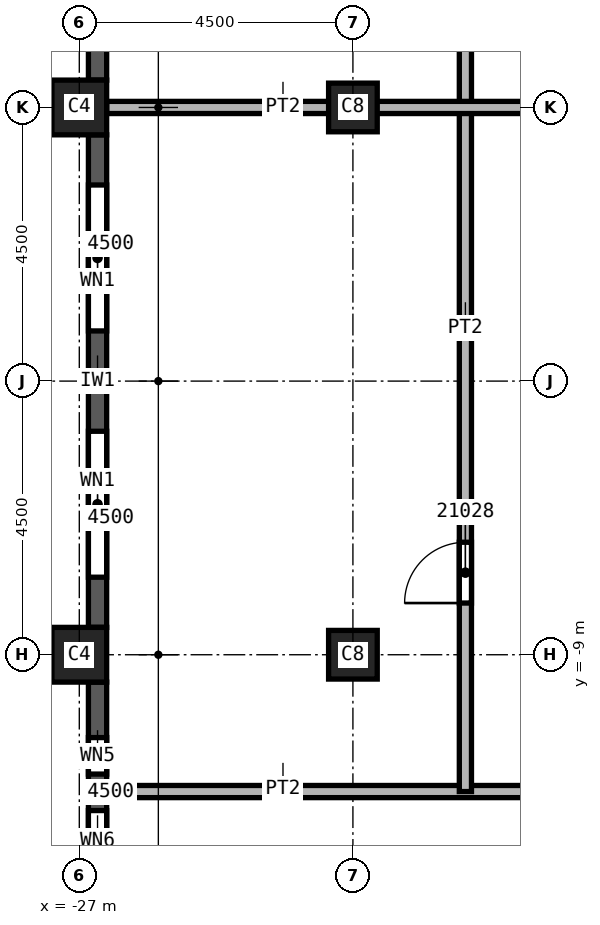
"""IFC4 building model, lengths in metres.
Left out: names, types, materials, properties, quantities, classifications, styles, units other than length and angle.
Written with IfcOpenShell. Run it as: python <this file> out.ifc"""

import sys

from ifc_helpers import new_model, si_unit, direction, frame, frame_2d, origin, origin_2d, place, context, subcontext, project, spatial, rectangle, extrude, element, fill, save


model = new_model("IFC4")
c1 = context("Model", 3, precision=1e-05, world=origin(), true_north=direction((0.0, 1.0)))
c2 = subcontext(c1, "Body", "Model", "MODEL_VIEW")
j1 = project(units=[si_unit("LENGTHUNIT", "METRE"), si_unit("PLANEANGLEUNIT", "RADIAN")], contexts=[c1])
p1 = place(None, origin())
s1 = spatial("IfcSite", under=j1, at=p1, CompositionType="ELEMENT")
p2 = place(p1, origin())
s2 = spatial("IfcBuilding", under=s1, at=p2, CompositionType="ELEMENT")
p3 = place(p2, frame((0.0, 0.0, 308.0)))
s3 = spatial("IfcBuildingStorey", under=s2, at=p3, CompositionType="ELEMENT", Elevation=308.0)
for number, where, z_axis, x_axis in (
    (1, (-22.5, 0.0, 0.0), (0.0, 0.0, 1.0), (1.0, 0.0, 0.0)),
    (2, (-22.5, -9.0, 0.0), (0.0, 0.0, 1.0), (1.0, 0.0, 0.0)),
):
    element("IfcColumn", number, at=place(p3, frame(where, z_axis=z_axis, x_axis=x_axis)), inside=s3, PredefinedType="COLUMN", context=c2, shape_type="SweptSolid", body=[
        extrude(rectangle(XDim=0.8, YDim=0.8, at=origin_2d()), origin(), (0.0, 0.0, 1.0), 3.74),
    ])
for number, where, z_axis, x_axis in (
    (3, (-27.0, 0.0, 0.0), (0.0, 0.0, 1.0), (0.0, 1.0, 0.0)),
    (4, (-27.0, -9.0, 0.0), (0.0, 0.0, 1.0), (0.0, 1.0, 0.0)),
):
    element("IfcColumn", number, at=place(p3, frame(where, z_axis=z_axis, x_axis=x_axis)), inside=s3, PredefinedType="COLUMN", context=c2, shape_type="SweptSolid", body=[
        extrude(rectangle(XDim=0.9, YDim=0.9, at=origin_2d()), origin(), (0.0, 0.0, 1.0), 3.74),
    ])
p4 = place(p3, frame((-26.7, 8.55, 0.0), z_axis=(0.0, 0.0, 1.0), x_axis=(0.0, -1.0, 0.0)))
e5 = element("IfcWall", 5, at=p4, inside=s3, PredefinedType="SOLIDWALL", context=c2, shape_type="SweptSolid", body=[
    extrude(rectangle(XDim=8.1, YDim=0.3, at=frame_2d((4.05, 0.0))), origin(), (0.0, 0.0, 1.0), 3.14),
])
p5 = place(p4, frame((4.875, 0.0, 0.8)))
e6 = element("IfcOpeningElement", 6, at=p5, cuts=e5, PredefinedType="OPENING", context=c2, shape_type="SweptSolid", body=[
    extrude(rectangle(XDim=2.4, YDim=1.95, at=frame_2d((1.2, 0.975))), frame((0.0, 0.15, 0.0), z_axis=(0.0, -1.0, 0.0), x_axis=(1.0, 0.0, 0.0)), (0.0, 0.0, 1.0), 0.3),
])
p6 = place(p4, frame((0.913, 0.0, 0.8)))
e7 = element("IfcOpeningElement", 7, at=p6, cuts=e5, PredefinedType="OPENING", context=c2, shape_type="SweptSolid", body=[
    extrude(rectangle(XDim=0.6, YDim=1.95, at=frame_2d((0.3, 0.975))), frame((0.0, 0.15, 0.0), z_axis=(0.0, -1.0, 0.0), x_axis=(1.0, 0.0, 0.0)), (0.0, 0.0, 1.0), 0.3),
])
p7 = place(p4, frame((2.113, 0.0, 0.8)))
e8 = element("IfcOpeningElement", 8, at=p7, cuts=e5, PredefinedType="OPENING", context=c2, shape_type="SweptSolid", body=[
    extrude(rectangle(XDim=1.0, YDim=1.95, at=frame_2d((0.5, 0.975))), frame((0.0, 0.15, 0.0), z_axis=(0.0, -1.0, 0.0), x_axis=(1.0, 0.0, 0.0)), (0.0, 0.0, 1.0), 0.3),
])
p8 = place(p3, frame((-26.7, -0.45, 0.0), z_axis=(0.0, 0.0, 1.0), x_axis=(0.0, -1.0, 0.0)))
e9 = element("IfcWall", 9, at=p8, inside=s3, PredefinedType="SOLIDWALL", context=c2, shape_type="SweptSolid", body=[
    extrude(rectangle(XDim=8.1, YDim=0.3, at=frame_2d((4.05, 0.0))), origin(), (0.0, 0.0, 1.0), 3.14),
])
p9 = place(p8, frame((0.825, 0.0, 0.8)))
e10 = element("IfcOpeningElement", 10, at=p9, cuts=e9, PredefinedType="OPENING", context=c2, shape_type="SweptSolid", body=[
    extrude(rectangle(XDim=2.4, YDim=1.95, at=frame_2d((1.2, 0.975))), frame((0.0, 0.15, 0.0), z_axis=(0.0, -1.0, 0.0), x_axis=(1.0, 0.0, 0.0)), (0.0, 0.0, 1.0), 0.3),
])
p10 = place(p8, frame((4.875, 0.0, 0.8)))
e11 = element("IfcOpeningElement", 11, at=p10, cuts=e9, PredefinedType="OPENING", context=c2, shape_type="SweptSolid", body=[
    extrude(rectangle(XDim=2.4, YDim=1.95, at=frame_2d((1.2, 0.975))), frame((0.0, 0.15, 0.0), z_axis=(0.0, -1.0, 0.0), x_axis=(1.0, 0.0, 0.0)), (0.0, 0.0, 1.0), 0.3),
])
p11 = place(p3, frame((-26.7, -9.45, 0.0), z_axis=(0.0, 0.0, 1.0), x_axis=(0.0, -1.0, 0.0)))
e12 = element("IfcWall", 12, at=p11, inside=s3, PredefinedType="SOLIDWALL", context=c2, shape_type="SweptSolid", body=[
    extrude(rectangle(XDim=8.1, YDim=0.3, at=frame_2d((4.05, 0.0))), origin(), (0.0, 0.0, 1.0), 3.14),
])
p12 = place(p11, frame((0.913, 0.0, 0.8)))
e13 = element("IfcOpeningElement", 13, at=p12, cuts=e12, PredefinedType="OPENING", context=c2, shape_type="SweptSolid", body=[
    extrude(rectangle(XDim=0.6, YDim=1.95, at=frame_2d((0.3, 0.975))), frame((0.0, 0.15, 0.0), z_axis=(0.0, -1.0, 0.0), x_axis=(1.0, 0.0, 0.0)), (0.0, 0.0, 1.0), 0.3),
])
p13 = place(p11, frame((2.113, 0.0, 0.8)))
e14 = element("IfcOpeningElement", 14, at=p13, cuts=e12, PredefinedType="OPENING", context=c2, shape_type="SweptSolid", body=[
    extrude(rectangle(XDim=1.0, YDim=1.95, at=frame_2d((0.5, 0.975))), frame((0.0, 0.15, 0.0), z_axis=(0.0, -1.0, 0.0), x_axis=(1.0, 0.0, 0.0)), (0.0, 0.0, 1.0), 0.3),
])
p14 = place(p11, frame((5.425, 0.0, 0.8)))
e15 = element("IfcOpeningElement", 15, at=p14, cuts=e12, PredefinedType="OPENING", context=c2, shape_type="SweptSolid", body=[
    extrude(rectangle(XDim=1.8, YDim=1.95, at=frame_2d((0.9, 0.975))), frame((0.0, 0.15, 0.0), z_axis=(0.0, -1.0, 0.0), x_axis=(1.0, 0.0, 0.0)), (0.0, 0.0, 1.0), 0.3),
])
p15 = place(p3, frame((-26.55, -11.25, 0.0), z_axis=(0.0, 0.0, 1.0), x_axis=(1.0, 0.0, 0.0)))
e16 = element("IfcWall", 16, at=p15, inside=s3, PredefinedType="PARTITIONING", context=c2, shape_type="SweptSolid", body=[
    extrude(rectangle(XDim=11.15, YDim=0.2, at=frame_2d((5.575, 0.0))), origin(), (0.0, 0.0, 1.0), 3.74),
])
p16 = place(p3, frame((-20.65, -11.25, 0.0), z_axis=(0.0, 0.0, 1.0), x_axis=(0.0, 1.0, 0.0)))
e17 = element("IfcWall", 17, at=p16, inside=s3, PredefinedType="PARTITIONING", context=c2, shape_type="SweptSolid", body=[
    extrude(rectangle(XDim=18.1, YDim=0.2, at=frame_2d((9.05, 0.0))), origin(), (0.0, 0.0, 1.0), 3.74),
])
p17 = place(p16, frame((16.8, 0.0, 0.0)))
e18 = element("IfcOpeningElement", 18, at=p17, cuts=e17, PredefinedType="OPENING", context=c2, shape_type="SweptSolid", body=[
    extrude(rectangle(XDim=1.0, YDim=2.1, at=frame_2d((0.5, 1.05))), frame((0.0, 0.1, 0.0), z_axis=(0.0, -1.0, 0.0), x_axis=(1.0, 0.0, 0.0)), (0.0, 0.0, 1.0), 0.2),
])
p18 = place(p16, frame((3.1, 0.0, 0.0)))
e19 = element("IfcOpeningElement", 19, at=p18, cuts=e17, PredefinedType="OPENING", context=c2, shape_type="SweptSolid", body=[
    extrude(rectangle(XDim=1.0, YDim=2.1, at=frame_2d((0.5, 1.05))), frame((0.0, 0.1, 0.0), z_axis=(0.0, -1.0, 0.0), x_axis=(1.0, 0.0, 0.0)), (0.0, 0.0, 1.0), 0.2),
])
p19 = place(p3, frame((-15.4, 0.0, 0.0), z_axis=(0.0, 0.0, 1.0), x_axis=(-1.0, 0.0, 0.0)))
e20 = element("IfcWall", 20, at=p19, inside=s3, PredefinedType="PARTITIONING", context=c2, shape_type="SweptSolid", body=[
    extrude(rectangle(XDim=11.15, YDim=0.2, at=frame_2d((5.575, 0.0))), origin(), (0.0, 0.0, 1.0), 3.74),
])
p20 = place(p9, origin())
e21 = element("IfcWindow", 21, at=p20, inside=s3, PartitioningType="SINGLE_PANEL", PredefinedType="WINDOW", context=c2, shape_type="SweptSolid", body=[
    extrude(rectangle(XDim=2.4, YDim=1.95, at=frame_2d((1.2, 0.975))), frame((0.0, 0.03, 0.0), z_axis=(0.0, -1.0, 0.0), x_axis=(1.0, 0.0, 0.0)), (0.0, 0.0, 1.0), 0.06),
])
fill(e10, e21)
p21 = place(p10, origin())
e22 = element("IfcWindow", 22, at=p21, inside=s3, PartitioningType="SINGLE_PANEL", PredefinedType="WINDOW", context=c2, shape_type="SweptSolid", body=[
    extrude(rectangle(XDim=2.4, YDim=1.95, at=frame_2d((1.2, 0.975))), frame((0.0, 0.03, 0.0), z_axis=(0.0, -1.0, 0.0), x_axis=(1.0, 0.0, 0.0)), (0.0, 0.0, 1.0), 0.06),
])
fill(e11, e22)
p22 = place(p18, origin())
e23 = element("IfcDoor", 23, at=p22, inside=s3, OperationType="SINGLE_SWING_LEFT", PredefinedType="DOOR", context=c2, shape_type="SweptSolid", body=[
    extrude(rectangle(XDim=1.0, YDim=2.1, at=frame_2d((0.5, 1.05))), frame((0.0, 0.025, 0.0), z_axis=(0.0, -1.0, 0.0), x_axis=(1.0, 0.0, 0.0)), (0.0, 0.0, 1.0), 0.05),
])
fill(e19, e23)
p23 = place(p12, origin())
e24 = element("IfcWindow", 24, at=p23, inside=s3, PartitioningType="SINGLE_PANEL", PredefinedType="WINDOW", context=c2, shape_type="SweptSolid", body=[
    extrude(rectangle(XDim=0.6, YDim=1.95, at=frame_2d((0.3, 0.975))), frame((0.0, 0.03, 0.0), z_axis=(0.0, -1.0, 0.0), x_axis=(1.0, 0.0, 0.0)), (0.0, 0.0, 1.0), 0.06),
])
fill(e13, e24)
p24 = place(p13, origin())
e25 = element("IfcWindow", 25, at=p24, inside=s3, PartitioningType="SINGLE_PANEL", PredefinedType="WINDOW", context=c2, shape_type="SweptSolid", body=[
    extrude(rectangle(XDim=1.0, YDim=1.95, at=frame_2d((0.5, 0.975))), frame((0.0, 0.03, 0.0), z_axis=(0.0, -1.0, 0.0), x_axis=(1.0, 0.0, 0.0)), (0.0, 0.0, 1.0), 0.06),
])
fill(e14, e25)
save(model, sys.argv[1])
